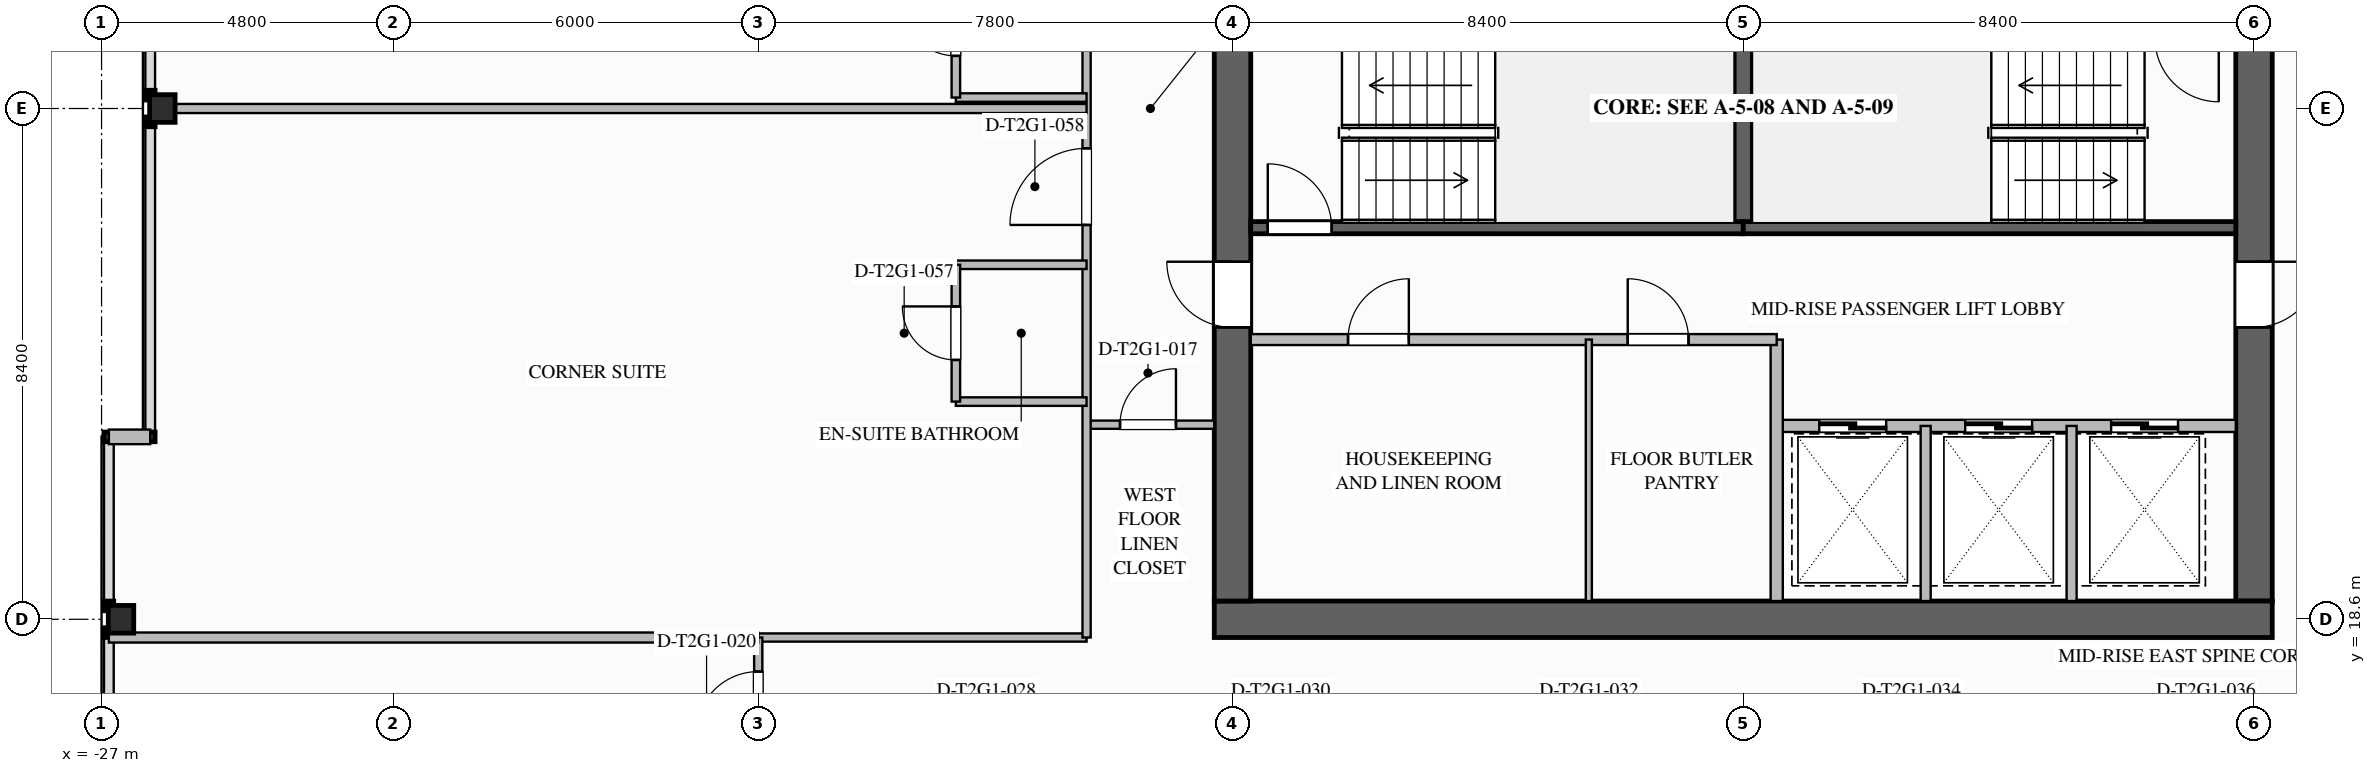
"""IFC4 building model, lengths in metres.
Left out: names, types, materials, properties, quantities, classifications, styles, units other than length and angle.
Written with IfcOpenShell. Run it as: python <this file> out.ifc"""

import sys

from ifc_helpers import new_model, si_unit, direction, frame, frame_2d, origin, origin_2d, place, context, subcontext, project, spatial, rectangle, i_section, extrude, element, fill, save


model = new_model("IFC4")
c1 = context("Model", 3, precision=1e-05, world=origin(), true_north=direction((0.0, 1.0)))
c2 = subcontext(c1, "Body", "Model", "MODEL_VIEW")
j1 = project(units=[si_unit("LENGTHUNIT", "METRE"), si_unit("PLANEANGLEUNIT", "RADIAN")], contexts=[c1])
p1 = place(None, origin())
s1 = spatial("IfcSite", under=j1, at=p1, CompositionType="ELEMENT")
p2 = place(p1, origin())
s2 = spatial("IfcBuilding", under=s1, at=p2, CompositionType="ELEMENT")
p3 = place(p2, frame((0.0, 0.0, 91.8)))
s3 = spatial("IfcBuildingStorey", under=s2, at=p3, CompositionType="ELEMENT", Elevation=91.8)
p4 = place(p3, frame((8.4, 35.1, 0.0), z_axis=(0.0, 0.0, 1.0), x_axis=(0.0, -1.0, 0.0)))
e1 = element("IfcWall", 1, at=p4, inside=s3, PredefinedType="SHEAR", context=c2, shape_type="SweptSolid", body=[
    extrude(rectangle(XDim=16.2, YDim=0.6, at=frame_2d((8.1, 0.0))), origin(), (0.0, 0.0, 1.0), 3.5),
])
p5 = place(p4, frame((3.08, 0.0, 0.0)))
e2 = element("IfcOpeningElement", 2, at=p5, cuts=e1, PredefinedType="OPENING", context=c2, shape_type="SweptSolid", body=[
    extrude(rectangle(XDim=1.12, YDim=2.1, at=frame_2d((0.56, 1.05))), frame((0.0, 0.31, 0.0), z_axis=(0.0, -1.0, 0.0), x_axis=(1.0, 0.0, 0.0)), (0.0, 0.0, 1.0), 0.62),
])
p6 = place(p4, frame((10.62, 0.0, 0.0)))
e3 = element("IfcOpeningElement", 3, at=p6, cuts=e1, PredefinedType="OPENING", context=c2, shape_type="SweptSolid", body=[
    extrude(rectangle(XDim=1.08, YDim=2.04, at=frame_2d((0.54, 1.02))), frame((0.0, 0.31, 0.0), z_axis=(0.0, -1.0, 0.0), x_axis=(1.0, 0.0, 0.0)), (0.0, 0.0, 1.0), 0.62),
])
p7 = place(p3, frame((8.7, 18.6, 0.0), z_axis=(0.0, 0.0, 1.0), x_axis=(-1.0, 0.0, 0.0)))
e4 = element("IfcWall", 4, at=p7, inside=s3, PredefinedType="SHEAR", context=c2, shape_type="SweptSolid", body=[
    extrude(rectangle(XDim=17.4, YDim=0.6, at=frame_2d((8.7, 0.0))), origin(), (0.0, 0.0, 1.0), 3.5),
])
p8 = place(p3, frame((-8.4, 18.9, 0.0), z_axis=(0.0, 0.0, 1.0), x_axis=(0.0, 1.0, 0.0)))
e5 = element("IfcWall", 5, at=p8, inside=s3, PredefinedType="SHEAR", context=c2, shape_type="SweptSolid", body=[
    extrude(rectangle(XDim=16.2, YDim=0.6, at=frame_2d((8.1, 0.0))), origin(), (0.0, 0.0, 1.0), 3.5),
])
p9 = place(p8, frame((4.5, 0.0, 0.0)))
e6 = element("IfcOpeningElement", 6, at=p9, cuts=e5, PredefinedType="OPENING", context=c2, shape_type="SweptSolid", body=[
    extrude(rectangle(XDim=1.08, YDim=2.04, at=frame_2d((0.54, 1.02))), frame((0.0, 0.31, 0.0), z_axis=(0.0, -1.0, 0.0), x_axis=(1.0, 0.0, 0.0)), (0.0, 0.0, 1.0), 0.62),
])
for number, where, z_axis, x_axis in (
    (7, (-26.68, 18.6, 0.0), (0.0, 0.0, 1.0), (1.0, 0.0, 0.0)),
    (8, (-26.0, 27.0, 0.0), (0.0, 0.0, 1.0), (1.0, 0.0, 0.0)),
):
    element("IfcColumn", number, at=place(p3, frame(where, z_axis=z_axis, x_axis=x_axis)), inside=s3, PredefinedType="COLUMN", context=c2, shape_type="SweptSolid", body=[
        extrude(i_section(OverallWidth=0.418, OverallDepth=0.455, WebThickness=0.042, FlangeThickness=0.068, FilletRadius=0.03, at=origin_2d()), origin(), (0.0, 0.0, 1.0), 3.497),
    ])
p10 = place(p3, frame((-26.88, 21.6, 0.0), z_axis=(0.0, 0.0, 1.0), x_axis=(1.0, 0.0, 0.0)))
e9 = element("IfcWall", 9, at=p10, inside=s3, PredefinedType="STANDARD", context=c2, shape_type="SweptSolid", body=[
    extrude(rectangle(XDim=0.68, YDim=0.24, at=frame_2d((0.34, 0.0))), origin(), (0.0, 0.0, 1.0), 3.24),
])
p11 = place(p3, frame((0.0, 25.04, 0.0), z_axis=(0.0, 0.0, 1.0), x_axis=(0.0, 1.0, 0.0)))
e10 = element("IfcWall", 10, at=p11, inside=s3, PredefinedType="SOLIDWALL", context=c2, shape_type="SweptSolid", body=[
    extrude(rectangle(XDim=3.12, YDim=0.3, at=frame_2d((1.56, 0.0))), origin(), (0.0, 0.0, 1.0), 3.24),
])
p12 = place(p3, frame((-8.1, 25.04, 0.0), z_axis=(0.0, 0.0, 1.0), x_axis=(1.0, 0.0, 0.0)))
e11 = element("IfcWall", 11, at=p12, inside=s3, PredefinedType="SOLIDWALL", context=c2, shape_type="SweptSolid", body=[
    extrude(rectangle(XDim=8.1, YDim=0.2, at=frame_2d((4.05, 0.0))), origin(), (0.0, 0.0, 1.0), 3.24),
])
p13 = place(p12, frame((0.28, 0.0, 0.0)))
e12 = element("IfcOpeningElement", 12, at=p13, cuts=e11, PredefinedType="OPENING", context=c2, shape_type="SweptSolid", body=[
    extrude(rectangle(XDim=1.05, YDim=2.1, at=frame_2d((0.525, 1.05))), frame((0.0, 0.11, 0.0), z_axis=(0.0, -1.0, 0.0), x_axis=(1.0, 0.0, 0.0)), (0.0, 0.0, 1.0), 0.22),
])
p14 = place(p3, frame((0.0, 25.04, 0.0), z_axis=(0.0, 0.0, 1.0), x_axis=(1.0, 0.0, 0.0)))
e13 = element("IfcWall", 13, at=p14, inside=s3, PredefinedType="SOLIDWALL", context=c2, shape_type="SweptSolid", body=[
    extrude(rectangle(XDim=8.1, YDim=0.2, at=frame_2d((4.05, 0.0))), origin(), (0.0, 0.0, 1.0), 3.24),
])
p15 = place(p3, frame((8.1, 21.78, 0.0), z_axis=(0.0, 0.0, 1.0), x_axis=(-1.0, 0.0, 0.0)))
e14 = element("IfcWall", 14, at=p15, inside=s3, PredefinedType="SOLIDWALL", context=c2, shape_type="SweptSolid", body=[
    extrude(rectangle(XDim=7.55, YDim=0.2, at=frame_2d((3.775, 0.0))), origin(), (0.0, 0.0, 1.0), 3.24),
])
p16 = place(p15, frame((5.75, 0.0, 0.0)))
e15 = element("IfcOpeningElement", 15, at=p16, cuts=e14, PredefinedType="OPENING", context=c2, shape_type="SweptSolid", body=[
    extrude(rectangle(XDim=1.1, YDim=2.2, at=frame_2d((0.55, 1.1))), frame((0.0, 0.11, 0.0), z_axis=(0.0, -1.0, 0.0), x_axis=(1.0, 0.0, 0.0)), (0.0, 0.0, 1.0), 0.22),
])
p17 = place(p15, frame((3.35, 0.0, 0.0)))
e16 = element("IfcOpeningElement", 16, at=p17, cuts=e14, PredefinedType="OPENING", context=c2, shape_type="SweptSolid", body=[
    extrude(rectangle(XDim=1.1, YDim=2.2, at=frame_2d((0.55, 1.1))), frame((0.0, 0.11, 0.0), z_axis=(0.0, -1.0, 0.0), x_axis=(1.0, 0.0, 0.0)), (0.0, 0.0, 1.0), 0.22),
])
p18 = place(p15, frame((0.95, 0.0, 0.0)))
e17 = element("IfcOpeningElement", 17, at=p18, cuts=e14, PredefinedType="OPENING", context=c2, shape_type="SweptSolid", body=[
    extrude(rectangle(XDim=1.1, YDim=2.2, at=frame_2d((0.55, 1.1))), frame((0.0, 0.11, 0.0), z_axis=(0.0, -1.0, 0.0), x_axis=(1.0, 0.0, 0.0)), (0.0, 0.0, 1.0), 0.22),
])
p19 = place(p3, frame((0.55, 18.9, 0.0), z_axis=(0.0, 0.0, 1.0), x_axis=(0.0, 1.0, 0.0)))
e18 = element("IfcWall", 18, at=p19, inside=s3, PredefinedType="SOLIDWALL", context=c2, shape_type="SweptSolid", body=[
    extrude(rectangle(XDim=4.3, YDim=0.2, at=frame_2d((2.15, 0.0))), origin(), (0.0, 0.0, 1.0), 3.24),
])
for number, where, z_axis, x_axis in (
    (19, (3.0, 18.9, 0.0), (0.0, 0.0, 1.0), (0.0, 1.0, 0.0)),
    (20, (5.4, 18.9, 0.0), (0.0, 0.0, 1.0), (0.0, 1.0, 0.0)),
):
    element("IfcWall", number, at=place(p3, frame(where, z_axis=z_axis, x_axis=x_axis)), inside=s3, PredefinedType="PARTITIONING", context=c2, shape_type="SweptSolid", body=[
        extrude(rectangle(XDim=2.88, YDim=0.165, at=frame_2d((1.44, 0.0))), origin(), (0.0, 0.0, 1.0), 3.24),
    ])
p20 = place(p3, frame((-8.1, 23.2, 0.0), z_axis=(0.0, 0.0, 1.0), x_axis=(1.0, 0.0, 0.0)))
e21 = element("IfcWall", 21, at=p20, inside=s3, PredefinedType="SOLIDWALL", context=c2, shape_type="SweptSolid", body=[
    extrude(rectangle(XDim=8.65, YDim=0.18, at=frame_2d((4.325, 0.0))), origin(), (0.0, 0.0, 1.0), 3.24),
])
p21 = place(p20, frame((1.6, 0.0, 0.0)))
e22 = element("IfcOpeningElement", 22, at=p21, cuts=e21, PredefinedType="OPENING", context=c2, shape_type="SweptSolid", body=[
    extrude(rectangle(XDim=1.0, YDim=2.1, at=frame_2d((0.5, 1.05))), frame((0.0, 0.1, 0.0), z_axis=(0.0, -1.0, 0.0), x_axis=(1.0, 0.0, 0.0)), (0.0, 0.0, 1.0), 0.2),
])
p22 = place(p20, frame((6.2, 0.0, 0.0)))
e23 = element("IfcOpeningElement", 23, at=p22, cuts=e21, PredefinedType="OPENING", context=c2, shape_type="SweptSolid", body=[
    extrude(rectangle(XDim=1.0, YDim=2.1, at=frame_2d((0.5, 1.05))), frame((0.0, 0.1, 0.0), z_axis=(0.0, -1.0, 0.0), x_axis=(1.0, 0.0, 0.0)), (0.0, 0.0, 1.0), 0.2),
])
p23 = place(p3, frame((-2.54, 18.9, 0.0), z_axis=(0.0, 0.0, 1.0), x_axis=(0.0, 1.0, 0.0)))
e24 = element("IfcWall", 24, at=p23, inside=s3, PredefinedType="PARTITIONING", context=c2, shape_type="SweptSolid", body=[
    extrude(rectangle(XDim=4.3, YDim=0.1, at=frame_2d((2.15, 0.0))), origin(), (0.0, 0.0, 1.0), 3.24),
])
p24 = place(p3, frame((-10.8, 21.8, 0.0), z_axis=(0.0, 0.0, 1.0), x_axis=(1.0, 0.0, 0.0)))
e25 = element("IfcWall", 25, at=p24, inside=s3, PredefinedType="PARTITIONING", context=c2, shape_type="SweptSolid", body=[
    extrude(rectangle(XDim=2.1, YDim=0.135, at=frame_2d((1.05, 0.0))), origin(), (0.0, 0.0, 1.0), 3.24),
])
p25 = place(p24, frame((0.55, 0.0, 0.0)))
e26 = element("IfcOpeningElement", 26, at=p25, cuts=e25, PredefinedType="OPENING", context=c2, shape_type="SweptSolid", body=[
    extrude(rectangle(XDim=0.92, YDim=2.1, at=frame_2d((0.46, 1.05))), frame((0.0, 0.077, 0.0), z_axis=(0.0, -1.0, 0.0), x_axis=(1.0, 0.0, 0.0)), (0.0, 0.0, 1.0), 0.155),
])
p26 = place(p3, frame((-16.2, 18.3, 0.0), z_axis=(0.0, 0.0, 1.0), x_axis=(1.0, 0.0, 0.0)))
e27 = element("IfcWall", 27, at=p26, inside=s3, PredefinedType="PARTITIONING", context=c2, shape_type="SweptSolid", body=[
    extrude(rectangle(XDim=5.4, YDim=0.135, at=frame_2d((2.7, 0.0))), origin(), (0.0, 0.0, 1.0), 3.24),
])
p27 = place(p3, frame((-10.8, 18.3, 0.0), z_axis=(0.0, 0.0, 1.0), x_axis=(0.0, 1.0, 0.0)))
e28 = element("IfcWall", 28, at=p27, inside=s3, PredefinedType="PARTITIONING", context=c2, shape_type="SweptSolid", body=[
    extrude(rectangle(XDim=17.4, YDim=0.135, at=frame_2d((8.7, 0.0))), origin(), (0.0, 0.0, 1.0), 3.24),
])
p28 = place(p27, frame((6.785, 0.0, 0.0)))
e29 = element("IfcOpeningElement", 29, at=p28, cuts=e28, PredefinedType="OPENING", context=c2, shape_type="SweptSolid", body=[
    extrude(rectangle(XDim=1.26, YDim=2.2, at=frame_2d((0.63, 1.1))), frame((0.0, 0.077, 0.0), z_axis=(0.0, -1.0, 0.0), x_axis=(1.0, 0.0, 0.0)), (0.0, 0.0, 1.0), 0.155),
])
p29 = place(p27, frame((11.785, 0.0, 0.0)))
e30 = element("IfcOpeningElement", 30, at=p29, cuts=e28, PredefinedType="OPENING", context=c2, shape_type="SweptSolid", body=[
    extrude(rectangle(XDim=1.26, YDim=2.2, at=frame_2d((0.63, 1.1))), frame((0.0, 0.077, 0.0), z_axis=(0.0, -1.0, 0.0), x_axis=(1.0, 0.0, 0.0)), (0.0, 0.0, 1.0), 0.155),
])
p30 = place(p3, frame((-16.2, 16.2, 0.0), z_axis=(0.0, 0.0, 1.0), x_axis=(0.0, 1.0, 0.0)))
e31 = element("IfcWall", 31, at=p30, inside=s3, PredefinedType="PARTITIONING", context=c2, shape_type="SweptSolid", body=[
    extrude(rectangle(XDim=2.1, YDim=0.135, at=frame_2d((1.05, 0.0))), origin(), (0.0, 0.0, 1.0), 2.452),
])
p31 = place(p30, frame((0.52, 0.0, 0.0)))
e32 = element("IfcOpeningElement", 32, at=p31, cuts=e31, PredefinedType="OPENING", context=c2, shape_type="SweptSolid", body=[
    extrude(rectangle(XDim=1.02, YDim=2.15, at=frame_2d((0.51, 1.075))), frame((0.0, 0.077, 0.0), z_axis=(0.0, -1.0, 0.0), x_axis=(1.0, 0.0, 0.0)), (0.0, 0.0, 1.0), 0.155),
])
p32 = place(p3, frame((-26.88, 18.3, 0.0), z_axis=(0.0, 0.0, 1.0), x_axis=(1.0, 0.0, 0.0)))
e33 = element("IfcWall", 33, at=p32, inside=s3, PredefinedType="PARTITIONING", context=c2, shape_type="SweptSolid", body=[
    extrude(rectangle(XDim=10.68, YDim=0.165, at=frame_2d((5.34, 0.0))), origin(), (0.0, 0.0, 1.0), 2.452),
])
p33 = place(p3, frame((-26.2, 27.0, 0.0), z_axis=(0.0, 0.0, 1.0), x_axis=(1.0, 0.0, 0.0)))
e34 = element("IfcWall", 34, at=p33, inside=s3, PredefinedType="PARTITIONING", context=c2, shape_type="SweptSolid", body=[
    extrude(rectangle(XDim=15.4, YDim=0.15, at=frame_2d((7.7, 0.0))), origin(), (0.0, 0.0, 1.0), 2.452),
])
for number, where, z_axis, x_axis in (
    (35, (-10.8, 22.18, 0.0), (0.0, 0.0, 1.0), (-1.0, 0.0, 0.0)),
    (36, (-10.8, 24.43, 0.0), (0.0, 0.0, 1.0), (-1.0, 0.0, 0.0)),
):
    element("IfcWall", number, at=place(p3, frame(where, z_axis=z_axis, x_axis=x_axis)), inside=s3, PredefinedType="PLUMBINGWALL", context=c2, shape_type="SweptSolid", body=[
        extrude(rectangle(XDim=2.15, YDim=0.14, at=frame_2d((1.075, 0.0))), origin(), (0.0, 0.0, 1.0), 3.24),
    ])
p34 = place(p3, frame((-12.95, 22.18, 0.0), z_axis=(0.0, 0.0, 1.0), x_axis=(0.0, 1.0, 0.0)))
e37 = element("IfcWall", 37, at=p34, inside=s3, PredefinedType="PLUMBINGWALL", context=c2, shape_type="SweptSolid", body=[
    extrude(rectangle(XDim=2.25, YDim=0.14, at=frame_2d((1.125, 0.0))), origin(), (0.0, 0.0, 1.0), 3.24),
])
p35 = place(p34, frame((0.685, 0.0, 0.0)))
e38 = element("IfcOpeningElement", 38, at=p35, cuts=e37, PredefinedType="OPENING", context=c2, shape_type="SweptSolid", body=[
    extrude(rectangle(XDim=0.88, YDim=2.1, at=frame_2d((0.44, 1.05))), frame((0.0, 0.08, 0.0), z_axis=(0.0, -1.0, 0.0), x_axis=(1.0, 0.0, 0.0)), (0.0, 0.0, 1.0), 0.16),
])
p36 = place(p3, frame((-10.8, 27.18, 0.0), z_axis=(0.0, 0.0, 1.0), x_axis=(-1.0, 0.0, 0.0)))
e39 = element("IfcWall", 39, at=p36, inside=s3, PredefinedType="PLUMBINGWALL", context=c2, shape_type="SweptSolid", body=[
    extrude(rectangle(XDim=2.15, YDim=0.14, at=frame_2d((1.075, 0.0))), origin(), (0.0, 0.0, 1.0), 2.617),
])
p37 = place(p3, frame((-12.95, 27.18, 0.0), z_axis=(0.0, 0.0, 1.0), x_axis=(0.0, 1.0, 0.0)))
e40 = element("IfcWall", 40, at=p37, inside=s3, PredefinedType="PLUMBINGWALL", context=c2, shape_type="SweptSolid", body=[
    extrude(rectangle(XDim=2.25, YDim=0.14, at=frame_2d((1.125, 0.0))), origin(), (0.0, 0.0, 1.0), 3.24),
])
p38 = place(p37, frame((0.685, 0.0, 0.0)))
e41 = element("IfcOpeningElement", 41, at=p38, cuts=e40, PredefinedType="OPENING", context=c2, shape_type="SweptSolid", body=[
    extrude(rectangle(XDim=0.88, YDim=2.1, at=frame_2d((0.44, 1.05))), frame((0.0, 0.08, 0.0), z_axis=(0.0, -1.0, 0.0), x_axis=(1.0, 0.0, 0.0)), (0.0, 0.0, 1.0), 0.16),
])
p39 = place(p13, origin())
e42 = element("IfcDoor", 42, at=p39, inside=s3, OperationType="SINGLE_SWING_LEFT", PredefinedType="DOOR", context=c2, shape_type="SweptSolid", body=[
    extrude(rectangle(XDim=1.05, YDim=2.1, at=frame_2d((0.525, 1.05))), frame((0.0, 0.025, 0.0), z_axis=(0.0, -1.0, 0.0), x_axis=(1.0, 0.0, 0.0)), (0.0, 0.0, 1.0), 0.05),
])
fill(e12, e42)
p40 = place(p16, origin())
e43 = element("IfcDoor", 43, at=p40, inside=s3, OperationType="SLIDING_TO_LEFT", PredefinedType="DOOR", context=c2, shape_type="SweptSolid", body=[
    extrude(rectangle(XDim=1.1, YDim=2.2, at=frame_2d((0.55, 1.1))), frame((0.0, 0.025, 0.0), z_axis=(0.0, -1.0, 0.0), x_axis=(1.0, 0.0, 0.0)), (0.0, 0.0, 1.0), 0.05),
])
fill(e15, e43)
p41 = place(p17, origin())
e44 = element("IfcDoor", 44, at=p41, inside=s3, OperationType="SLIDING_TO_LEFT", PredefinedType="DOOR", context=c2, shape_type="SweptSolid", body=[
    extrude(rectangle(XDim=1.1, YDim=2.2, at=frame_2d((0.55, 1.1))), frame((0.0, 0.025, 0.0), z_axis=(0.0, -1.0, 0.0), x_axis=(1.0, 0.0, 0.0)), (0.0, 0.0, 1.0), 0.05),
])
fill(e16, e44)
p42 = place(p18, origin())
e45 = element("IfcDoor", 45, at=p42, inside=s3, OperationType="SLIDING_TO_LEFT", PredefinedType="DOOR", context=c2, shape_type="SweptSolid", body=[
    extrude(rectangle(XDim=1.1, YDim=2.2, at=frame_2d((0.55, 1.1))), frame((0.0, 0.025, 0.0), z_axis=(0.0, -1.0, 0.0), x_axis=(1.0, 0.0, 0.0)), (0.0, 0.0, 1.0), 0.05),
])
fill(e17, e45)
p43 = place(p9, origin())
e46 = element("IfcDoor", 46, at=p43, inside=s3, OperationType="SINGLE_SWING_RIGHT", PredefinedType="DOOR", context=c2, shape_type="SweptSolid", body=[
    extrude(rectangle(XDim=1.08, YDim=2.04, at=frame_2d((0.54, 1.02))), frame((0.0, 0.025, 0.0), z_axis=(0.0, -1.0, 0.0), x_axis=(1.0, 0.0, 0.0)), (0.0, 0.0, 1.0), 0.05),
])
fill(e6, e46)
p44 = place(p6, origin())
e47 = element("IfcDoor", 47, at=p44, inside=s3, OperationType="SINGLE_SWING_LEFT", PredefinedType="DOOR", context=c2, shape_type="SweptSolid", body=[
    extrude(rectangle(XDim=1.08, YDim=2.04, at=frame_2d((0.54, 1.02))), frame((0.0, 0.025, 0.0), z_axis=(0.0, -1.0, 0.0), x_axis=(1.0, 0.0, 0.0)), (0.0, 0.0, 1.0), 0.05),
])
fill(e3, e47)
p45 = place(p21, origin())
e48 = element("IfcDoor", 48, at=p45, inside=s3, OperationType="SINGLE_SWING_RIGHT", PredefinedType="DOOR", context=c2, shape_type="SweptSolid", body=[
    extrude(rectangle(XDim=1.0, YDim=2.1, at=frame_2d((0.5, 1.05))), frame((0.0, 0.025, 0.0), z_axis=(0.0, -1.0, 0.0), x_axis=(1.0, 0.0, 0.0)), (0.0, 0.0, 1.0), 0.05),
])
fill(e22, e48)
p46 = place(p22, origin())
e49 = element("IfcDoor", 49, at=p46, inside=s3, OperationType="SINGLE_SWING_LEFT", PredefinedType="DOOR", context=c2, shape_type="SweptSolid", body=[
    extrude(rectangle(XDim=1.0, YDim=2.1, at=frame_2d((0.5, 1.05))), frame((0.0, 0.025, 0.0), z_axis=(0.0, -1.0, 0.0), x_axis=(1.0, 0.0, 0.0)), (0.0, 0.0, 1.0), 0.05),
])
fill(e23, e49)
p47 = place(p25, origin())
e50 = element("IfcDoor", 50, at=p47, inside=s3, OperationType="SINGLE_SWING_RIGHT", PredefinedType="DOOR", context=c2, shape_type="SweptSolid", body=[
    extrude(rectangle(XDim=0.92, YDim=2.1, at=frame_2d((0.46, 1.05))), frame((0.0, 0.025, 0.0), z_axis=(0.0, -1.0, 0.0), x_axis=(1.0, 0.0, 0.0)), (0.0, 0.0, 1.0), 0.05),
])
fill(e26, e50)
p48 = place(p31, origin())
e51 = element("IfcDoor", 51, at=p48, inside=s3, OperationType="SINGLE_SWING_LEFT", PredefinedType="DOOR", context=c2, shape_type="SweptSolid", body=[
    extrude(rectangle(XDim=1.02, YDim=2.15, at=frame_2d((0.51, 1.075))), frame((0.0, 0.025, 0.0), z_axis=(0.0, -1.0, 0.0), x_axis=(1.0, 0.0, 0.0)), (0.0, 0.0, 1.0), 0.05),
])
fill(e32, e51)
p49 = place(p35, origin())
e52 = element("IfcDoor", 52, at=p49, inside=s3, OperationType="SINGLE_SWING_RIGHT", PredefinedType="DOOR", context=c2, shape_type="SweptSolid", body=[
    extrude(rectangle(XDim=0.88, YDim=2.1, at=frame_2d((0.44, 1.05))), frame((0.0, 0.025, 0.0), z_axis=(0.0, -1.0, 0.0), x_axis=(1.0, 0.0, 0.0)), (0.0, 0.0, 1.0), 0.05),
])
fill(e38, e52)
p50 = place(p28, origin())
e53 = element("IfcDoor", 53, at=p50, inside=s3, OperationType="SINGLE_SWING_LEFT", PredefinedType="DOOR", context=c2, shape_type="SweptSolid", body=[
    extrude(rectangle(XDim=1.26, YDim=2.2, at=frame_2d((0.63, 1.1))), frame((0.0, 0.025, 0.0), z_axis=(0.0, -1.0, 0.0), x_axis=(1.0, 0.0, 0.0)), (0.0, 0.0, 1.0), 0.05),
])
fill(e29, e53)
p51 = place(p38, origin())
e54 = element("IfcDoor", 54, at=p51, inside=s3, OperationType="SINGLE_SWING_RIGHT", PredefinedType="DOOR", context=c2, shape_type="SweptSolid", body=[
    extrude(rectangle(XDim=0.88, YDim=2.1, at=frame_2d((0.44, 1.05))), frame((0.0, 0.025, 0.0), z_axis=(0.0, -1.0, 0.0), x_axis=(1.0, 0.0, 0.0)), (0.0, 0.0, 1.0), 0.05),
])
fill(e41, e54)
save(model, sys.argv[1])
